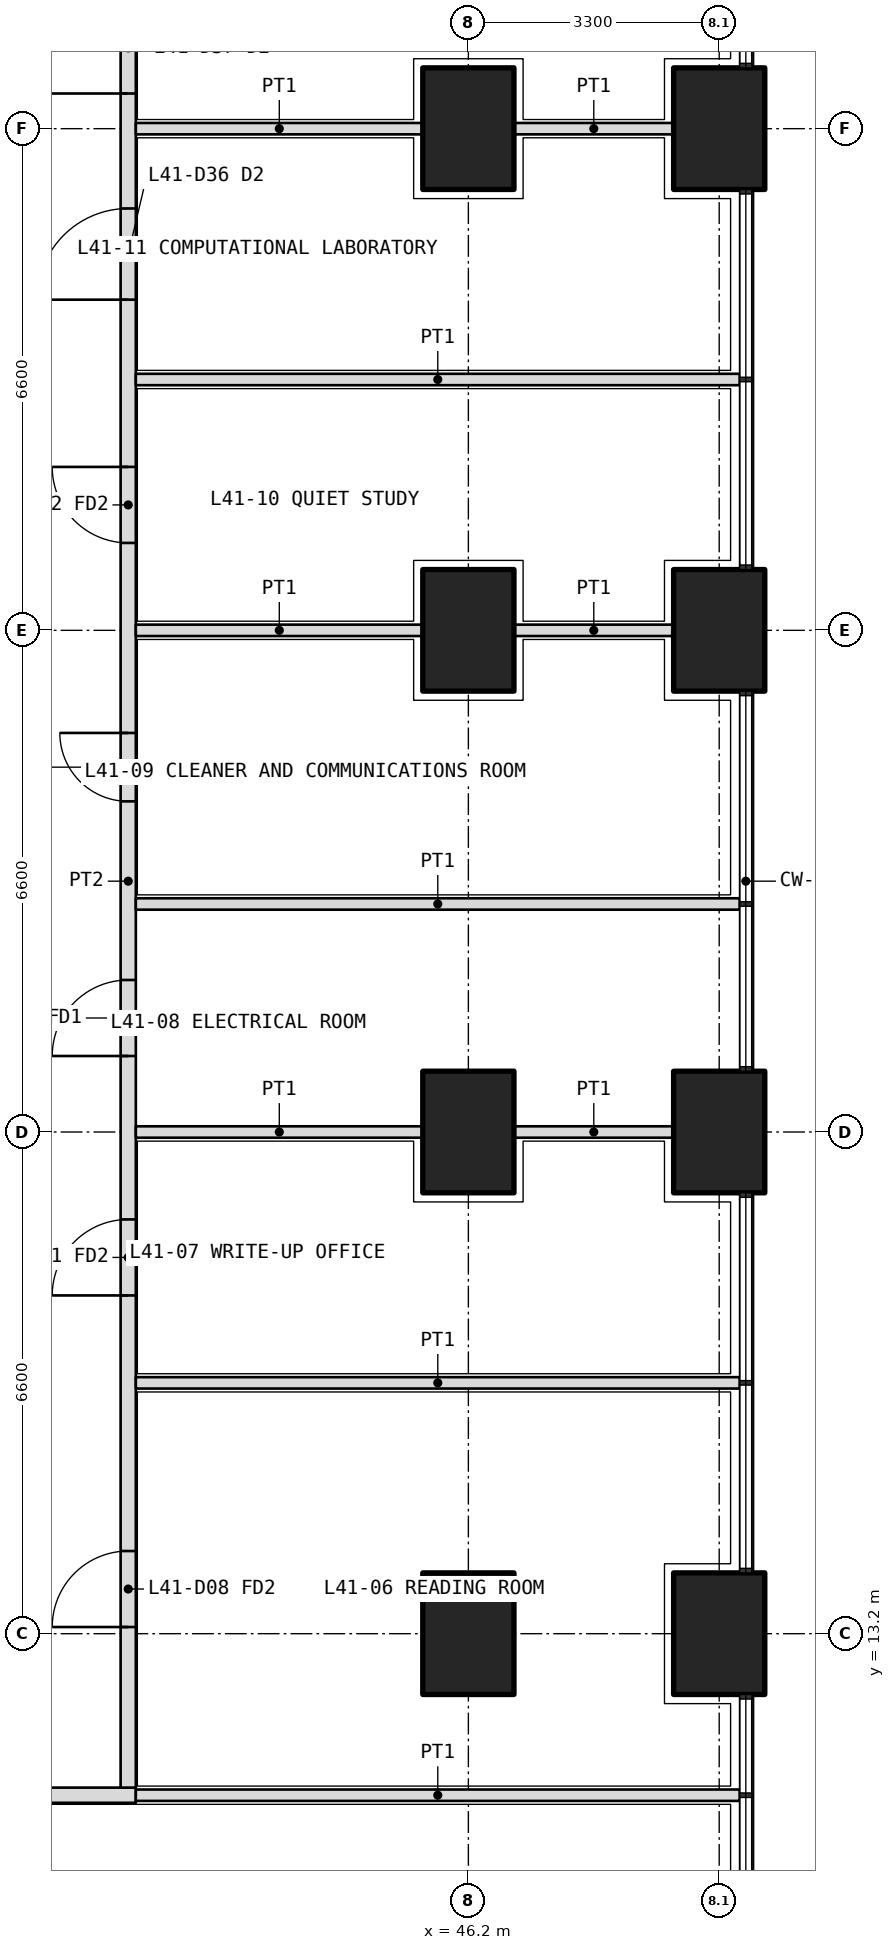
"""IFC4 building model, lengths in metres.
Left out: names, types, materials, properties, quantities, classifications, styles, units other than length and angle.
Written with IfcOpenShell. Run it as: python <this file> out.ifc"""

import sys

from ifc_helpers import new_model, si_unit, direction, frame, frame_2d, origin, origin_2d, place, context, subcontext, project, spatial, rectangle, extrude, element, fill, save


model = new_model("IFC4")
c1 = context("Model", 3, precision=1e-05, world=origin(), true_north=direction((0.0, 1.0)))
c2 = subcontext(c1, "Body", "Model", "MODEL_VIEW")
j1 = project(units=[si_unit("LENGTHUNIT", "METRE"), si_unit("PLANEANGLEUNIT", "RADIAN")], contexts=[c1])
p1 = place(None, origin())
s1 = spatial("IfcSite", under=j1, at=p1, CompositionType="ELEMENT")
p2 = place(p1, origin())
s2 = spatial("IfcBuilding", under=s1, at=p2, CompositionType="ELEMENT")
p3 = place(p2, frame((0.0, 0.0, 180.9)))
s3 = spatial("IfcBuildingStorey", under=s2, at=p3, CompositionType="ELEMENT", Elevation=180.9)
for number, where, z_axis, x_axis in (
    (1, (49.5, 13.2, 0.0), (0.0, 0.0, 1.0), (0.0, 1.0, 0.0)),
    (2, (49.5, 19.8, 0.0), (0.0, 0.0, 1.0), (0.0, 1.0, 0.0)),
    (3, (49.5, 26.4, 0.0), (0.0, 0.0, 1.0), (0.0, 1.0, 0.0)),
    (4, (49.5, 33.0, 0.0), (0.0, 0.0, 1.0), (0.0, 1.0, 0.0)),
    (5, (46.2, 13.2, 0.0), (0.0, 0.0, 1.0), (0.0, 1.0, 0.0)),
    (6, (46.2, 19.8, 0.0), (0.0, 0.0, 1.0), (0.0, 1.0, 0.0)),
    (7, (46.2, 26.4, 0.0), (0.0, 0.0, 1.0), (0.0, 1.0, 0.0)),
    (8, (46.2, 33.0, 0.0), (0.0, 0.0, 1.0), (0.0, 1.0, 0.0)),
):
    element("IfcColumn", number, at=place(p3, frame(where, z_axis=z_axis, x_axis=x_axis)), inside=s3, PredefinedType="COLUMN", context=c2, shape_type="SweptSolid", body=[
        extrude(rectangle(XDim=1.6, YDim=1.2, at=origin_2d()), origin(), (0.0, 0.0, 1.0), 4.2),
    ])
p4 = place(p3, frame((36.3, 11.075, 0.0), z_axis=(0.0, 0.0, 1.0), x_axis=(1.0, 0.0, 0.0)))
e9 = element("IfcWall", 9, at=p4, inside=s3, PredefinedType="PARTITIONING", context=c2, shape_type="SweptSolid", body=[
    extrude(rectangle(XDim=5.525, YDim=0.2, at=frame_2d((2.762, 0.0))), origin(), (0.0, 0.0, 1.0), 2.85),
])
p5 = place(p4, frame((2.113, 0.0, 0.0)))
e10 = element("IfcOpeningElement", 10, at=p5, cuts=e9, PredefinedType="OPENING", context=c2, shape_type="SweptSolid", body=[
    extrude(rectangle(XDim=1.2, YDim=2.1, at=frame_2d((0.6, 1.05))), frame((0.0, 0.11, 0.0), z_axis=(0.0, -1.0, 0.0), x_axis=(1.0, 0.0, 0.0)), (0.0, 0.0, 1.0), 0.22),
])
p6 = place(p3, frame((41.725, 11.175, 0.0), z_axis=(0.0, 0.0, 1.0), x_axis=(0.0, 1.0, 0.0)))
e11 = element("IfcWall", 11, at=p6, inside=s3, PredefinedType="PARTITIONING", context=c2, shape_type="SweptSolid", body=[
    extrude(rectangle(XDim=23.85, YDim=0.2, at=frame_2d((11.925, 0.0))), origin(), (0.0, 0.0, 1.0), 2.85),
])
p7 = place(p6, frame((2.113, 0.0, 0.0)))
e12 = element("IfcOpeningElement", 12, at=p7, cuts=e11, PredefinedType="OPENING", context=c2, shape_type="SweptSolid", body=[
    extrude(rectangle(XDim=1.0, YDim=2.1, at=frame_2d((0.5, 1.05))), frame((0.0, 0.11, 0.0), z_axis=(0.0, -1.0, 0.0), x_axis=(1.0, 0.0, 0.0)), (0.0, 0.0, 1.0), 0.22),
])
p8 = place(p6, frame((6.475, 0.0, 0.0)))
e13 = element("IfcOpeningElement", 13, at=p8, cuts=e11, PredefinedType="OPENING", context=c2, shape_type="SweptSolid", body=[
    extrude(rectangle(XDim=1.0, YDim=2.1, at=frame_2d((0.5, 1.05))), frame((0.0, 0.11, 0.0), z_axis=(0.0, -1.0, 0.0), x_axis=(1.0, 0.0, 0.0)), (0.0, 0.0, 1.0), 0.22),
])
p9 = place(p6, frame((9.625, 0.0, 0.0)))
e14 = element("IfcOpeningElement", 14, at=p9, cuts=e11, PredefinedType="OPENING", context=c2, shape_type="SweptSolid", body=[
    extrude(rectangle(XDim=1.0, YDim=2.1, at=frame_2d((0.5, 1.05))), frame((0.0, 0.11, 0.0), z_axis=(0.0, -1.0, 0.0), x_axis=(1.0, 0.0, 0.0)), (0.0, 0.0, 1.0), 0.22),
])
p10 = place(p6, frame((12.975, 0.0, 0.0)))
e15 = element("IfcOpeningElement", 15, at=p10, cuts=e11, PredefinedType="OPENING", context=c2, shape_type="SweptSolid", body=[
    extrude(rectangle(XDim=0.9, YDim=2.1, at=frame_2d((0.45, 1.05))), frame((0.0, 0.11, 0.0), z_axis=(0.0, -1.0, 0.0), x_axis=(1.0, 0.0, 0.0)), (0.0, 0.0, 1.0), 0.22),
])
p11 = place(p6, frame((16.375, 0.0, 0.0)))
e16 = element("IfcOpeningElement", 16, at=p11, cuts=e11, PredefinedType="OPENING", context=c2, shape_type="SweptSolid", body=[
    extrude(rectangle(XDim=1.0, YDim=2.1, at=frame_2d((0.5, 1.05))), frame((0.0, 0.11, 0.0), z_axis=(0.0, -1.0, 0.0), x_axis=(1.0, 0.0, 0.0)), (0.0, 0.0, 1.0), 0.22),
])
p12 = place(p6, frame((19.575, 0.0, 0.0)))
e17 = element("IfcOpeningElement", 17, at=p12, cuts=e11, PredefinedType="OPENING", context=c2, shape_type="SweptSolid", body=[
    extrude(rectangle(XDim=1.2, YDim=2.1, at=frame_2d((0.6, 1.05))), frame((0.0, 0.11, 0.0), z_axis=(0.0, -1.0, 0.0), x_axis=(1.0, 0.0, 0.0)), (0.0, 0.0, 1.0), 0.22),
])
p13 = place(p6, frame((22.288, 0.0, 0.0)))
e18 = element("IfcOpeningElement", 18, at=p13, cuts=e11, PredefinedType="OPENING", context=c2, shape_type="SweptSolid", body=[
    extrude(rectangle(XDim=1.2, YDim=2.1, at=frame_2d((0.6, 1.05))), frame((0.0, 0.11, 0.0), z_axis=(0.0, -1.0, 0.0), x_axis=(1.0, 0.0, 0.0)), (0.0, 0.0, 1.0), 0.22),
])
for number, where, z_axis, x_axis in (
    (19, (49.77, 11.075, 0.0), (0.0, 0.0, 1.0), (-1.0, 0.0, 0.0)),
    (20, (49.77, 22.8, 0.0), (0.0, 0.0, 1.0), (-1.0, 0.0, 0.0)),
):
    element("IfcWall", number, at=place(p3, frame(where, z_axis=z_axis, x_axis=x_axis)), inside=s3, PredefinedType="PARTITIONING", context=c2, shape_type="SweptSolid", body=[
        extrude(rectangle(XDim=7.945, YDim=0.15, at=frame_2d((3.973, 0.0))), origin(), (0.0, 0.0, 1.0), 2.7),
    ])
p14 = place(p3, frame((48.9, 26.4, 0.0), z_axis=(0.0, 0.0, 1.0), x_axis=(-1.0, 0.0, 0.0)))
e21 = element("IfcWall", 21, at=p14, inside=s3, PredefinedType="PARTITIONING", context=c2, shape_type="SweptSolid", body=[
    extrude(rectangle(XDim=2.1, YDim=0.15, at=frame_2d((1.05, 0.0))), origin(), (0.0, 0.0, 1.0), 2.85),
])
p15 = place(p3, frame((45.6, 26.4, 0.0), z_axis=(0.0, 0.0, 1.0), x_axis=(-1.0, 0.0, 0.0)))
e22 = element("IfcWall", 22, at=p15, inside=s3, PredefinedType="PARTITIONING", context=c2, shape_type="SweptSolid", body=[
    extrude(rectangle(XDim=3.775, YDim=0.15, at=frame_2d((1.888, 0.0))), origin(), (0.0, 0.0, 1.0), 2.85),
])
p16 = place(p3, frame((49.77, 16.5, 0.0), z_axis=(0.0, 0.0, 1.0), x_axis=(-1.0, 0.0, 0.0)))
e23 = element("IfcWall", 23, at=p16, inside=s3, PredefinedType="PARTITIONING", context=c2, shape_type="SweptSolid", body=[
    extrude(rectangle(XDim=7.945, YDim=0.15, at=frame_2d((3.973, 0.0))), origin(), (0.0, 0.0, 1.0), 2.7),
])
p17 = place(p3, frame((48.9, 19.8, 0.0), z_axis=(0.0, 0.0, 1.0), x_axis=(-1.0, 0.0, 0.0)))
e24 = element("IfcWall", 24, at=p17, inside=s3, PredefinedType="PARTITIONING", context=c2, shape_type="SweptSolid", body=[
    extrude(rectangle(XDim=2.1, YDim=0.15, at=frame_2d((1.05, 0.0))), origin(), (0.0, 0.0, 1.0), 2.85),
])
p18 = place(p3, frame((45.6, 19.8, 0.0), z_axis=(0.0, 0.0, 1.0), x_axis=(-1.0, 0.0, 0.0)))
e25 = element("IfcWall", 25, at=p18, inside=s3, PredefinedType="PARTITIONING", context=c2, shape_type="SweptSolid", body=[
    extrude(rectangle(XDim=3.775, YDim=0.15, at=frame_2d((1.888, 0.0))), origin(), (0.0, 0.0, 1.0), 2.85),
])
p19 = place(p3, frame((49.77, 29.7, 0.0), z_axis=(0.0, 0.0, 1.0), x_axis=(-1.0, 0.0, 0.0)))
e26 = element("IfcWall", 26, at=p19, inside=s3, PredefinedType="PARTITIONING", context=c2, shape_type="SweptSolid", body=[
    extrude(rectangle(XDim=7.945, YDim=0.15, at=frame_2d((3.973, 0.0))), origin(), (0.0, 0.0, 1.0), 2.7),
])
p20 = place(p3, frame((48.9, 33.0, 0.0), z_axis=(0.0, 0.0, 1.0), x_axis=(-1.0, 0.0, 0.0)))
e27 = element("IfcWall", 27, at=p20, inside=s3, PredefinedType="PARTITIONING", context=c2, shape_type="SweptSolid", body=[
    extrude(rectangle(XDim=2.1, YDim=0.15, at=frame_2d((1.05, 0.0))), origin(), (0.0, 0.0, 1.0), 2.85),
])
p21 = place(p3, frame((45.6, 33.0, 0.0), z_axis=(0.0, 0.0, 1.0), x_axis=(-1.0, 0.0, 0.0)))
e28 = element("IfcWall", 28, at=p21, inside=s3, PredefinedType="PARTITIONING", context=c2, shape_type="SweptSolid", body=[
    extrude(rectangle(XDim=3.775, YDim=0.15, at=frame_2d((1.888, 0.0))), origin(), (0.0, 0.0, 1.0), 2.85),
])
p22 = place(p7, origin())
e29 = element("IfcDoor", 29, at=p22, inside=s3, OperationType="SINGLE_SWING_LEFT", PredefinedType="DOOR", context=c2, shape_type="SweptSolid", body=[
    extrude(rectangle(XDim=1.0, YDim=2.1, at=frame_2d((0.5, 1.05))), frame((0.0, 0.025, 0.0), z_axis=(0.0, -1.0, 0.0), x_axis=(1.0, 0.0, 0.0)), (0.0, 0.0, 1.0), 0.05),
])
fill(e12, e29)
p23 = place(p8, origin())
e30 = element("IfcDoor", 30, at=p23, inside=s3, OperationType="SINGLE_SWING_LEFT", PredefinedType="DOOR", context=c2, shape_type="SweptSolid", body=[
    extrude(rectangle(XDim=1.0, YDim=2.1, at=frame_2d((0.5, 1.05))), frame((0.0, 0.025, 0.0), z_axis=(0.0, -1.0, 0.0), x_axis=(1.0, 0.0, 0.0)), (0.0, 0.0, 1.0), 0.05),
])
fill(e13, e30)
p24 = place(p9, origin())
e31 = element("IfcDoor", 31, at=p24, inside=s3, OperationType="SINGLE_SWING_LEFT", PredefinedType="DOOR", context=c2, shape_type="SweptSolid", body=[
    extrude(rectangle(XDim=1.0, YDim=2.1, at=frame_2d((0.5, 1.05))), frame((0.0, 0.025, 0.0), z_axis=(0.0, -1.0, 0.0), x_axis=(1.0, 0.0, 0.0)), (0.0, 0.0, 1.0), 0.05),
])
fill(e14, e31)
p25 = place(p10, origin())
e32 = element("IfcDoor", 32, at=p25, inside=s3, OperationType="SINGLE_SWING_RIGHT", PredefinedType="DOOR", context=c2, shape_type="SweptSolid", body=[
    extrude(rectangle(XDim=0.9, YDim=2.1, at=frame_2d((0.45, 1.05))), frame((0.0, 0.025, 0.0), z_axis=(0.0, -1.0, 0.0), x_axis=(1.0, 0.0, 0.0)), (0.0, 0.0, 1.0), 0.05),
])
fill(e15, e32)
p26 = place(p11, origin())
e33 = element("IfcDoor", 33, at=p26, inside=s3, OperationType="SINGLE_SWING_RIGHT", PredefinedType="DOOR", context=c2, shape_type="SweptSolid", body=[
    extrude(rectangle(XDim=1.0, YDim=2.1, at=frame_2d((0.5, 1.05))), frame((0.0, 0.025, 0.0), z_axis=(0.0, -1.0, 0.0), x_axis=(1.0, 0.0, 0.0)), (0.0, 0.0, 1.0), 0.05),
])
fill(e16, e33)
p27 = place(p12, origin())
e34 = element("IfcDoor", 34, at=p27, inside=s3, OperationType="DOUBLE_DOOR_SINGLE_SWING", PredefinedType="DOOR", context=c2, shape_type="SweptSolid", body=[
    extrude(rectangle(XDim=1.2, YDim=2.1, at=frame_2d((0.6, 1.05))), frame((0.0, 0.025, 0.0), z_axis=(0.0, -1.0, 0.0), x_axis=(1.0, 0.0, 0.0)), (0.0, 0.0, 1.0), 0.05),
])
fill(e17, e34)
p28 = place(p13, origin())
e35 = element("IfcDoor", 35, at=p28, inside=s3, OperationType="DOUBLE_DOOR_SINGLE_SWING", PredefinedType="DOOR", context=c2, shape_type="SweptSolid", body=[
    extrude(rectangle(XDim=1.2, YDim=2.1, at=frame_2d((0.6, 1.05))), frame((0.0, 0.025, 0.0), z_axis=(0.0, -1.0, 0.0), x_axis=(1.0, 0.0, 0.0)), (0.0, 0.0, 1.0), 0.05),
])
fill(e18, e35)
save(model, sys.argv[1])
